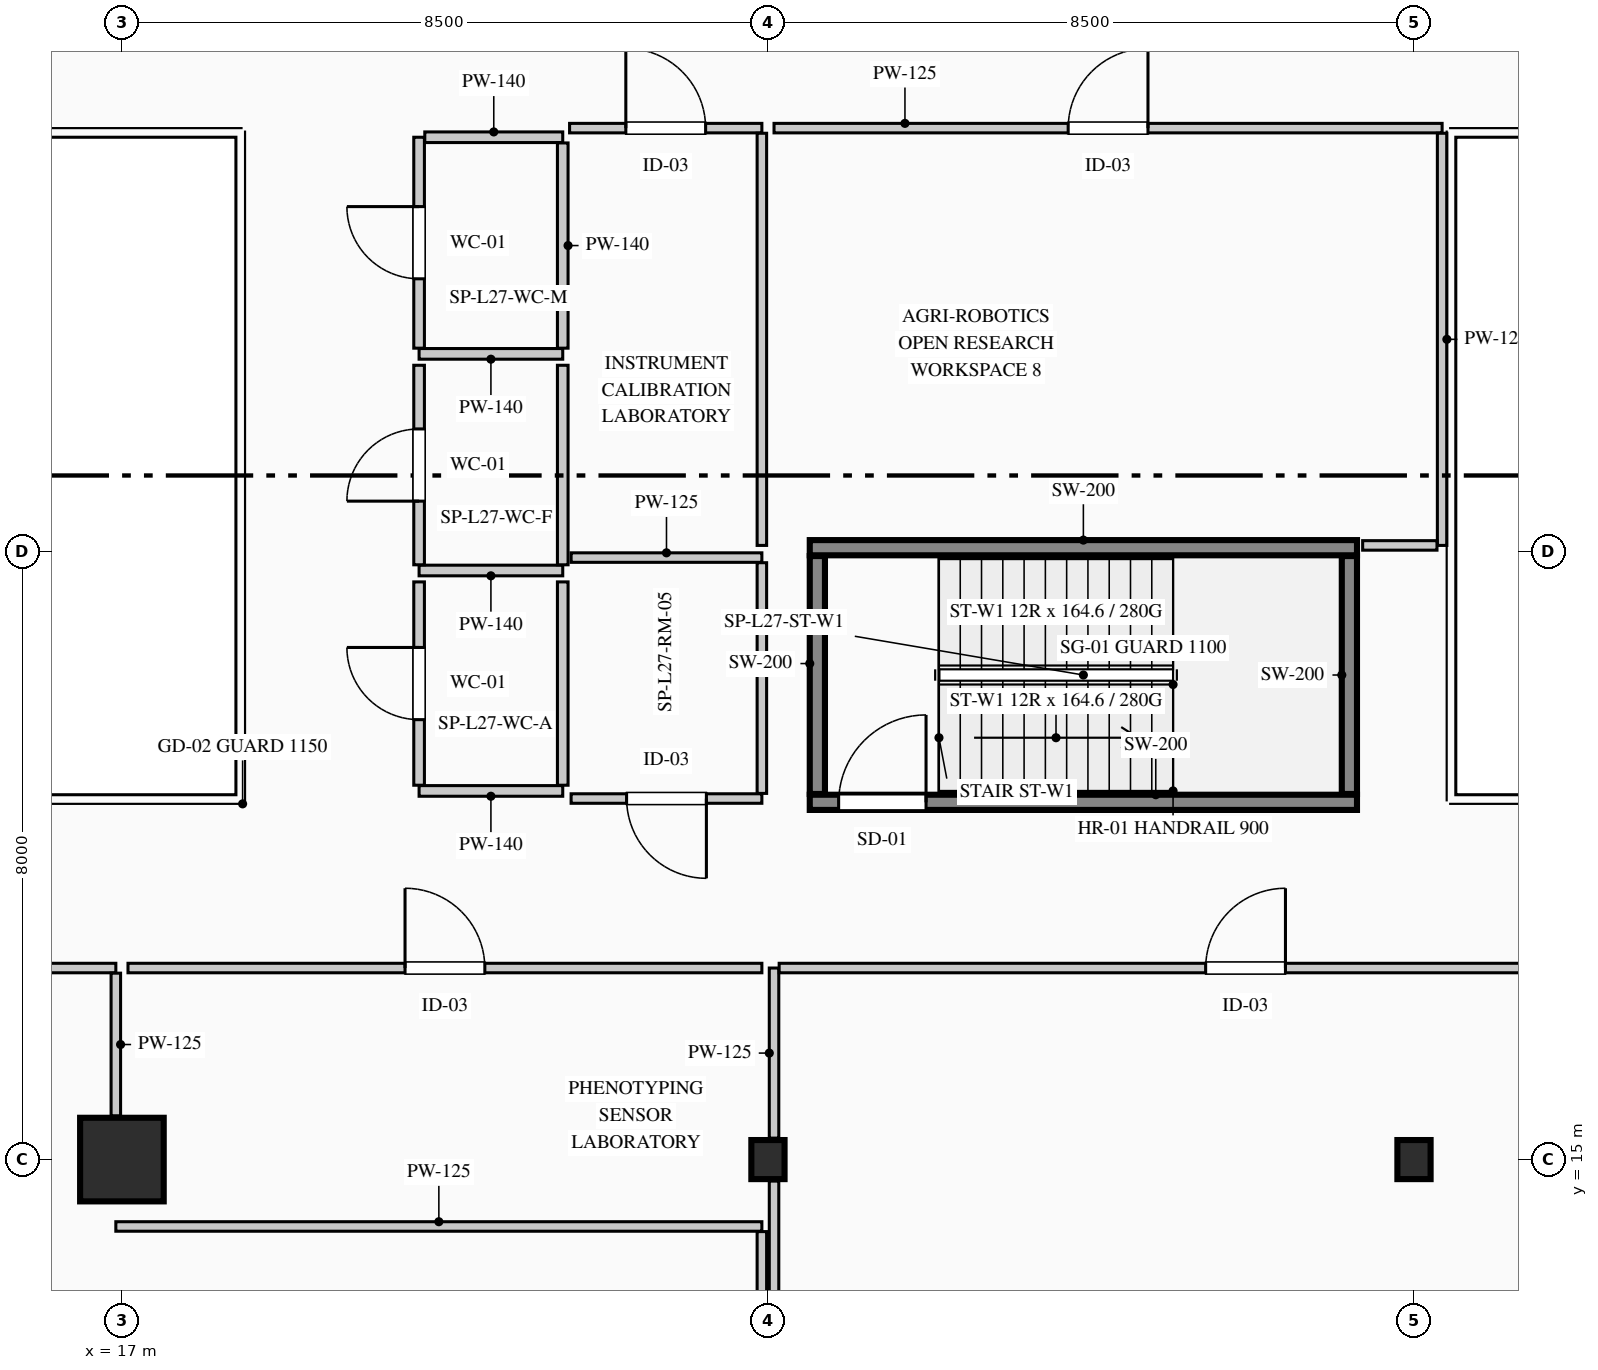
"""IFC4 building model, lengths in metres.
Left out: names, types, materials, properties, quantities, classifications, styles, units other than length and angle.
Written with IfcOpenShell. Run it as: python <this file> out.ifc"""

import sys

from ifc_helpers import new_model, si_unit, direction, frame, frame_2d, origin, origin_2d, place, context, subcontext, project, spatial, rectangle, i_section, extrude, element, fill, save


model = new_model("IFC4")
c1 = context("Model", 3, precision=1e-05, world=origin(), true_north=direction((0.0, 1.0)))
c2 = subcontext(c1, "Body", "Model", "MODEL_VIEW")
j1 = project(units=[si_unit("LENGTHUNIT", "METRE"), si_unit("PLANEANGLEUNIT", "RADIAN")], contexts=[c1])
p1 = place(None, origin())
s1 = spatial("IfcSite", under=j1, at=p1, CompositionType="ELEMENT")
p2 = place(p1, origin())
s2 = spatial("IfcBuilding", under=s1, at=p2, CompositionType="ELEMENT")
p3 = place(p2, frame((0.0, 0.0, 119.3)))
s3 = spatial("IfcBuildingStorey", under=s2, at=p3, CompositionType="ELEMENT", Elevation=119.3)
p4 = place(p3, frame((26.05, 19.7, 0.0), z_axis=(0.0, 0.0, 1.0), x_axis=(1.0, 0.0, 0.0)))
e1 = element("IfcWall", 1, at=p4, inside=s3, PredefinedType="SHEAR", context=c2, shape_type="SweptSolid", body=[
    extrude(rectangle(XDim=7.2, YDim=0.2, at=frame_2d((3.6, 0.0))), origin(), (0.0, 0.0, 1.0), 3.95),
])
p5 = place(p4, frame((0.38, 0.0, 0.0)))
e2 = element("IfcOpeningElement", 2, at=p5, cuts=e1, PredefinedType="OPENING", context=c2, shape_type="SweptSolid", body=[
    extrude(rectangle(XDim=1.15, YDim=2.2, at=frame_2d((0.575, 1.1))), frame((0.0, 0.11, 0.0), z_axis=(0.0, -1.0, 0.0), x_axis=(1.0, 0.0, 0.0)), (0.0, 0.0, 1.0), 0.22),
])
p6 = place(p3, frame((26.05, 23.05, 0.0), z_axis=(0.0, 0.0, 1.0), x_axis=(1.0, 0.0, 0.0)))
e3 = element("IfcWall", 3, at=p6, inside=s3, PredefinedType="SHEAR", context=c2, shape_type="SweptSolid", body=[
    extrude(rectangle(XDim=7.2, YDim=0.2, at=frame_2d((3.6, 0.0))), origin(), (0.0, 0.0, 1.0), 3.95),
])
for number, where, z_axis, x_axis in (
    (4, (26.15, 19.81, 0.0), (0.0, 0.0, 1.0), (0.0, 1.0, 0.0)),
    (5, (33.15, 19.81, 0.0), (0.0, 0.0, 1.0), (0.0, 1.0, 0.0)),
):
    element("IfcWall", number, at=place(p3, frame(where, z_axis=z_axis, x_axis=x_axis)), inside=s3, PredefinedType="SHEAR", context=c2, shape_type="SweptSolid", body=[
        extrude(rectangle(XDim=3.13, YDim=0.2, at=frame_2d((1.565, 0.0))), origin(), (0.0, 0.0, 1.0), 3.95),
    ])
p7 = place(p3, frame((17.0, 15.0, 0.0), z_axis=(0.0, 0.0, 1.0), x_axis=(1.0, 0.0, 0.0)))
e6 = element("IfcColumn", 6, at=p7, inside=s3, PredefinedType="COLUMN", context=c2, shape_type="SweptSolid", body=[
    extrude(rectangle(XDim=1.1, YDim=1.1, at=origin_2d()), origin(), (0.0, 0.0, 1.0), 3.95),
])
for number, where, z_axis, x_axis in (
    (7, (25.5, 15.0, 0.0), (0.0, 0.0, 1.0), (1.0, 0.0, 0.0)),
    (8, (34.0, 15.0, 0.0), (0.0, 0.0, 1.0), (1.0, 0.0, 0.0)),
):
    element("IfcColumn", number, at=place(p3, frame(where, z_axis=z_axis, x_axis=x_axis)), inside=s3, PredefinedType="COLUMN", context=c2, shape_type="SweptSolid", body=[
        extrude(i_section(OverallWidth=0.437, OverallDepth=0.514, WebThickness=0.061, FlangeThickness=0.077, FilletRadius=0.015, at=origin_2d()), origin(), (0.0, 0.0, 1.0), 3.95),
    ])
p8 = place(p3, frame((22.8, 25.6, 0.0), z_axis=(0.0, 0.0, 1.0), x_axis=(-1.0, 0.0, 0.0)))
e9 = element("IfcWall", 9, at=p8, inside=s3, PredefinedType="PARTITIONING", context=c2, shape_type="SweptSolid", body=[
    extrude(rectangle(XDim=1.89, YDim=0.14, at=frame_2d((0.945, 0.0))), origin(), (0.0, 0.0, 1.0), 3.69),
])
p9 = place(p3, frame((20.91, 25.675, 0.0), z_axis=(0.0, 0.0, 1.0), x_axis=(0.0, 1.0, 0.0)))
e10 = element("IfcWall", 10, at=p9, inside=s3, PredefinedType="PARTITIONING", context=c2, shape_type="SweptSolid", body=[
    extrude(rectangle(XDim=2.775, YDim=0.14, at=frame_2d((1.387, 0.0))), origin(), (0.0, 0.0, 1.0), 3.69),
])
p10 = place(p9, frame((0.913, 0.0, 0.0)))
e11 = element("IfcOpeningElement", 11, at=p10, cuts=e10, PredefinedType="OPENING", context=c2, shape_type="SweptSolid", body=[
    extrude(rectangle(XDim=0.95, YDim=2.15, at=frame_2d((0.475, 1.075))), frame((0.0, 0.08, 0.0), z_axis=(0.0, -1.0, 0.0), x_axis=(1.0, 0.0, 0.0)), (0.0, 0.0, 1.0), 0.16),
])
p11 = place(p3, frame((20.985, 28.45, 0.0), z_axis=(0.0, 0.0, 1.0), x_axis=(1.0, 0.0, 0.0)))
e12 = element("IfcWall", 12, at=p11, inside=s3, PredefinedType="PARTITIONING", context=c2, shape_type="SweptSolid", body=[
    extrude(rectangle(XDim=1.815, YDim=0.14, at=frame_2d((0.907, 0.0))), origin(), (0.0, 0.0, 1.0), 3.69),
])
p12 = place(p3, frame((22.8, 28.375, 0.0), z_axis=(0.0, 0.0, 1.0), x_axis=(0.0, -1.0, 0.0)))
e13 = element("IfcWall", 13, at=p12, inside=s3, PredefinedType="PARTITIONING", context=c2, shape_type="SweptSolid", body=[
    extrude(rectangle(XDim=2.7, YDim=0.14, at=frame_2d((1.35, 0.0))), origin(), (0.0, 0.0, 1.0), 3.315),
])
p13 = place(p3, frame((22.8, 22.75, 0.0), z_axis=(0.0, 0.0, 1.0), x_axis=(-1.0, 0.0, 0.0)))
e14 = element("IfcWall", 14, at=p13, inside=s3, PredefinedType="PARTITIONING", context=c2, shape_type="SweptSolid", body=[
    extrude(rectangle(XDim=1.89, YDim=0.14, at=frame_2d((0.945, 0.0))), origin(), (0.0, 0.0, 1.0), 3.69),
])
p14 = place(p3, frame((20.91, 22.825, 0.0), z_axis=(0.0, 0.0, 1.0), x_axis=(0.0, 1.0, 0.0)))
e15 = element("IfcWall", 15, at=p14, inside=s3, PredefinedType="PARTITIONING", context=c2, shape_type="SweptSolid", body=[
    extrude(rectangle(XDim=2.625, YDim=0.14, at=frame_2d((1.312, 0.0))), origin(), (0.0, 0.0, 1.0), 3.69),
])
p15 = place(p14, frame((0.837, 0.0, 0.0)))
e16 = element("IfcOpeningElement", 16, at=p15, cuts=e15, PredefinedType="OPENING", context=c2, shape_type="SweptSolid", body=[
    extrude(rectangle(XDim=0.95, YDim=2.15, at=frame_2d((0.475, 1.075))), frame((0.0, 0.08, 0.0), z_axis=(0.0, -1.0, 0.0), x_axis=(1.0, 0.0, 0.0)), (0.0, 0.0, 1.0), 0.16),
])
p16 = place(p3, frame((22.8, 25.45, 0.0), z_axis=(0.0, 0.0, 1.0), x_axis=(0.0, -1.0, 0.0)))
e17 = element("IfcWall", 17, at=p16, inside=s3, PredefinedType="PARTITIONING", context=c2, shape_type="SweptSolid", body=[
    extrude(rectangle(XDim=2.625, YDim=0.14, at=frame_2d((1.312, 0.0))), origin(), (0.0, 0.0, 1.0), 3.315),
])
p17 = place(p3, frame((22.8, 19.85, 0.0), z_axis=(0.0, 0.0, 1.0), x_axis=(-1.0, 0.0, 0.0)))
e18 = element("IfcWall", 18, at=p17, inside=s3, PredefinedType="PARTITIONING", context=c2, shape_type="SweptSolid", body=[
    extrude(rectangle(XDim=1.89, YDim=0.14, at=frame_2d((0.945, 0.0))), origin(), (0.0, 0.0, 1.0), 3.69),
])
p18 = place(p3, frame((20.91, 19.925, 0.0), z_axis=(0.0, 0.0, 1.0), x_axis=(0.0, 1.0, 0.0)))
e19 = element("IfcWall", 19, at=p18, inside=s3, PredefinedType="PARTITIONING", context=c2, shape_type="SweptSolid", body=[
    extrude(rectangle(XDim=2.675, YDim=0.14, at=frame_2d((1.337, 0.0))), origin(), (0.0, 0.0, 1.0), 3.69),
])
p19 = place(p18, frame((0.863, 0.0, 0.0)))
e20 = element("IfcOpeningElement", 20, at=p19, cuts=e19, PredefinedType="OPENING", context=c2, shape_type="SweptSolid", body=[
    extrude(rectangle(XDim=0.95, YDim=2.15, at=frame_2d((0.475, 1.075))), frame((0.0, 0.08, 0.0), z_axis=(0.0, -1.0, 0.0), x_axis=(1.0, 0.0, 0.0)), (0.0, 0.0, 1.0), 0.16),
])
p20 = place(p3, frame((22.8, 22.6, 0.0), z_axis=(0.0, 0.0, 1.0), x_axis=(0.0, -1.0, 0.0)))
e21 = element("IfcWall", 21, at=p20, inside=s3, PredefinedType="PARTITIONING", context=c2, shape_type="SweptSolid", body=[
    extrude(rectangle(XDim=2.675, YDim=0.14, at=frame_2d((1.337, 0.0))), origin(), (0.0, 0.0, 1.0), 3.315),
])
p21 = place(p3, frame((6.36, 17.52, 0.0), z_axis=(0.0, 0.0, 1.0), x_axis=(1.0, 0.0, 0.0)))
e22 = element("IfcWall", 22, at=p21, inside=s3, PredefinedType="PARTITIONING", context=c2, shape_type="SweptSolid", body=[
    extrude(rectangle(XDim=10.56, YDim=0.125, at=frame_2d((5.28, 0.0))), origin(), (0.0, 0.0, 1.0), 3.69),
])
p22 = place(p21, frame((4.755, 0.0, 0.0)))
e23 = element("IfcOpeningElement", 23, at=p22, cuts=e22, PredefinedType="OPENING", context=c2, shape_type="SweptSolid", body=[
    extrude(rectangle(XDim=1.05, YDim=2.15, at=frame_2d((0.525, 1.075))), frame((0.0, 0.073, 0.0), z_axis=(0.0, -1.0, 0.0), x_axis=(1.0, 0.0, 0.0)), (0.0, 0.0, 1.0), 0.145),
])
p23 = place(p3, frame((16.92, 17.452, 0.0), z_axis=(0.0, 0.0, 1.0), x_axis=(0.0, -1.0, 0.0)))
e24 = element("IfcWall", 24, at=p23, inside=s3, PredefinedType="PARTITIONING", context=c2, shape_type="SweptSolid", body=[
    extrude(rectangle(XDim=1.877, YDim=0.125, at=frame_2d((0.939, 0.0))), origin(), (0.0, 0.0, 1.0), 3.69),
])
p24 = place(p3, frame((16.92, 14.12, 0.0), z_axis=(0.0, 0.0, 1.0), x_axis=(1.0, 0.0, 0.0)))
e25 = element("IfcWall", 25, at=p24, inside=s3, PredefinedType="PARTITIONING", context=c2, shape_type="SweptSolid", body=[
    extrude(rectangle(XDim=8.5, YDim=0.125, at=frame_2d((4.25, 0.0))), origin(), (0.0, 0.0, 1.0), 3.69),
])
p25 = place(p3, frame((25.42, 14.052, 0.0), z_axis=(0.0, 0.0, 1.0), x_axis=(0.0, -1.0, 0.0)))
e26 = element("IfcWall", 26, at=p25, inside=s3, PredefinedType="PARTITIONING", context=c2, shape_type="SweptSolid", body=[
    extrude(rectangle(XDim=1.038, YDim=0.125, at=frame_2d((0.519, 0.0))), origin(), (0.0, 0.0, 1.0), 3.69),
])
p26 = place(p3, frame((25.58, 13.015, 0.0), z_axis=(0.0, 0.0, 1.0), x_axis=(0.0, 1.0, 0.0)))
e27 = element("IfcWall", 27, at=p26, inside=s3, PredefinedType="PARTITIONING", context=c2, shape_type="SweptSolid", body=[
    extrude(rectangle(XDim=1.703, YDim=0.125, at=frame_2d((0.852, 0.0))), origin(), (0.0, 0.0, 1.0), 3.69),
])
p27 = place(p3, frame((25.58, 15.282, 0.0), z_axis=(0.0, 0.0, 1.0), x_axis=(0.0, 1.0, 0.0)))
e28 = element("IfcWall", 28, at=p27, inside=s3, PredefinedType="PARTITIONING", context=c2, shape_type="SweptSolid", body=[
    extrude(rectangle(XDim=2.238, YDim=0.125, at=frame_2d((1.119, 0.0))), origin(), (0.0, 0.0, 1.0), 2.875),
])
p28 = place(p3, frame((25.647, 17.52, 0.0), z_axis=(0.0, 0.0, 1.0), x_axis=(1.0, 0.0, 0.0)))
e29 = element("IfcWall", 29, at=p28, inside=s3, PredefinedType="PARTITIONING", context=c2, shape_type="SweptSolid", body=[
    extrude(rectangle(XDim=12.272, YDim=0.125, at=frame_2d((6.136, 0.0))), origin(), (0.0, 0.0, 1.0), 3.475),
])
p29 = place(p28, frame((5.611, 0.0, 0.0)))
e30 = element("IfcOpeningElement", 30, at=p29, cuts=e29, PredefinedType="OPENING", context=c2, shape_type="SweptSolid", body=[
    extrude(rectangle(XDim=1.05, YDim=2.15, at=frame_2d((0.525, 1.075))), frame((0.0, 0.073, 0.0), z_axis=(0.0, -1.0, 0.0), x_axis=(1.0, 0.0, 0.0)), (0.0, 0.0, 1.0), 0.145),
])
p30 = place(p3, frame((17.08, 17.52, 0.0), z_axis=(0.0, 0.0, 1.0), x_axis=(1.0, 0.0, 0.0)))
e31 = element("IfcWall", 31, at=p30, inside=s3, PredefinedType="PARTITIONING", context=c2, shape_type="SweptSolid", body=[
    extrude(rectangle(XDim=8.34, YDim=0.125, at=frame_2d((4.17, 0.0))), origin(), (0.0, 0.0, 1.0), 3.69),
])
p31 = place(p30, frame((3.645, 0.0, 0.0)))
e32 = element("IfcOpeningElement", 32, at=p31, cuts=e31, PredefinedType="OPENING", context=c2, shape_type="SweptSolid", body=[
    extrude(rectangle(XDim=1.05, YDim=2.15, at=frame_2d((0.525, 1.075))), frame((0.0, 0.073, 0.0), z_axis=(0.0, -1.0, 0.0), x_axis=(1.0, 0.0, 0.0)), (0.0, 0.0, 1.0), 0.145),
])
p32 = place(p3, frame((25.42, 19.75, 0.0), z_axis=(0.0, 0.0, 1.0), x_axis=(-1.0, 0.0, 0.0)))
e33 = element("IfcWall", 33, at=p32, inside=s3, PredefinedType="PARTITIONING", context=c2, shape_type="SweptSolid", body=[
    extrude(rectangle(XDim=2.51, YDim=0.125, at=frame_2d((1.255, 0.0))), origin(), (0.0, 0.0, 1.0), 3.69),
])
p33 = place(p32, frame((0.73, 0.0, 0.0)))
e34 = element("IfcOpeningElement", 34, at=p33, cuts=e33, PredefinedType="OPENING", context=c2, shape_type="SweptSolid", body=[
    extrude(rectangle(XDim=1.05, YDim=2.15, at=frame_2d((0.525, 1.075))), frame((0.0, 0.073, 0.0), z_axis=(0.0, -1.0, 0.0), x_axis=(1.0, 0.0, 0.0)), (0.0, 0.0, 1.0), 0.145),
])
p34 = place(p3, frame((22.91, 22.92, 0.0), z_axis=(0.0, 0.0, 1.0), x_axis=(1.0, 0.0, 0.0)))
e35 = element("IfcWall", 35, at=p34, inside=s3, PredefinedType="PARTITIONING", context=c2, shape_type="SweptSolid", body=[
    extrude(rectangle(XDim=2.51, YDim=0.125, at=frame_2d((1.255, 0.0))), origin(), (0.0, 0.0, 1.0), 3.69),
])
p35 = place(p3, frame((25.42, 22.853, 0.0), z_axis=(0.0, 0.0, 1.0), x_axis=(0.0, -1.0, 0.0)))
e36 = element("IfcWall", 36, at=p35, inside=s3, PredefinedType="PARTITIONING", context=c2, shape_type="SweptSolid", body=[
    extrude(rectangle(XDim=3.035, YDim=0.125, at=frame_2d((1.518, 0.0))), origin(), (0.0, 0.0, 1.0), 2.875),
])
p36 = place(p3, frame((22.89, 28.57, 0.0), z_axis=(0.0, 0.0, 1.0), x_axis=(1.0, 0.0, 0.0)))
e37 = element("IfcWall", 37, at=p36, inside=s3, PredefinedType="PARTITIONING", context=c2, shape_type="SweptSolid", body=[
    extrude(rectangle(XDim=2.53, YDim=0.125, at=frame_2d((1.265, 0.0))), origin(), (0.0, 0.0, 1.0), 3.69),
])
p37 = place(p36, frame((0.74, 0.0, 0.0)))
e38 = element("IfcOpeningElement", 38, at=p37, cuts=e37, PredefinedType="OPENING", context=c2, shape_type="SweptSolid", body=[
    extrude(rectangle(XDim=1.05, YDim=2.15, at=frame_2d((0.525, 1.075))), frame((0.0, 0.073, 0.0), z_axis=(0.0, -1.0, 0.0), x_axis=(1.0, 0.0, 0.0)), (0.0, 0.0, 1.0), 0.145),
])
p38 = place(p3, frame((25.42, 28.502, 0.0), z_axis=(0.0, 0.0, 1.0), x_axis=(0.0, -1.0, 0.0)))
e39 = element("IfcWall", 39, at=p38, inside=s3, PredefinedType="PARTITIONING", context=c2, shape_type="SweptSolid", body=[
    extrude(rectangle(XDim=5.422, YDim=0.125, at=frame_2d((2.711, 0.0))), origin(), (0.0, 0.0, 1.0), 2.875),
])
p39 = place(p3, frame((25.58, 28.57, 0.0), z_axis=(0.0, 0.0, 1.0), x_axis=(1.0, 0.0, 0.0)))
e40 = element("IfcWall", 40, at=p39, inside=s3, PredefinedType="PARTITIONING", context=c2, shape_type="SweptSolid", body=[
    extrude(rectangle(XDim=8.79, YDim=0.125, at=frame_2d((4.395, 0.0))), origin(), (0.0, 0.0, 1.0), 3.475),
])
p40 = place(p39, frame((3.87, 0.0, 0.0)))
e41 = element("IfcOpeningElement", 41, at=p40, cuts=e40, PredefinedType="OPENING", context=c2, shape_type="SweptSolid", body=[
    extrude(rectangle(XDim=1.05, YDim=2.15, at=frame_2d((0.525, 1.075))), frame((0.0, 0.073, 0.0), z_axis=(0.0, -1.0, 0.0), x_axis=(1.0, 0.0, 0.0)), (0.0, 0.0, 1.0), 0.145),
])
p41 = place(p3, frame((34.37, 28.502, 0.0), z_axis=(0.0, 0.0, 1.0), x_axis=(0.0, -1.0, 0.0)))
e42 = element("IfcWall", 42, at=p41, inside=s3, PredefinedType="PARTITIONING", context=c2, shape_type="SweptSolid", body=[
    extrude(rectangle(XDim=5.422, YDim=0.125, at=frame_2d((2.711, 0.0))), origin(), (0.0, 0.0, 1.0), 3.69),
])
p42 = place(p3, frame((34.302, 23.08, 0.0), z_axis=(0.0, 0.0, 1.0), x_axis=(-1.0, 0.0, 0.0)))
e43 = element("IfcWall", 43, at=p42, inside=s3, PredefinedType="PARTITIONING", context=c2, shape_type="SweptSolid", body=[
    extrude(rectangle(XDim=0.978, YDim=0.125, at=frame_2d((0.489, 0.0))), origin(), (0.0, 0.0, 1.0), 3.69),
])
p43 = place(p5, origin())
e44 = element("IfcDoor", 44, at=p43, inside=s3, OperationType="SINGLE_SWING_RIGHT", PredefinedType="DOOR", context=c2, shape_type="SweptSolid", body=[
    extrude(rectangle(XDim=1.15, YDim=2.2, at=frame_2d((0.575, 1.1))), frame((0.0, 0.025, 0.0), z_axis=(0.0, -1.0, 0.0), x_axis=(1.0, 0.0, 0.0)), (0.0, 0.0, 1.0), 0.05),
])
fill(e2, e44)
p44 = place(p10, origin())
e45 = element("IfcDoor", 45, at=p44, inside=s3, OperationType="SINGLE_SWING_RIGHT", PredefinedType="DOOR", context=c2, shape_type="SweptSolid", body=[
    extrude(rectangle(XDim=0.95, YDim=2.15, at=frame_2d((0.475, 1.075))), frame((0.0, 0.025, 0.0), z_axis=(0.0, -1.0, 0.0), x_axis=(1.0, 0.0, 0.0)), (0.0, 0.0, 1.0), 0.05),
])
fill(e11, e45)
p45 = place(p15, origin())
e46 = element("IfcDoor", 46, at=p45, inside=s3, OperationType="SINGLE_SWING_LEFT", PredefinedType="DOOR", context=c2, shape_type="SweptSolid", body=[
    extrude(rectangle(XDim=0.95, YDim=2.15, at=frame_2d((0.475, 1.075))), frame((0.0, 0.025, 0.0), z_axis=(0.0, -1.0, 0.0), x_axis=(1.0, 0.0, 0.0)), (0.0, 0.0, 1.0), 0.05),
])
fill(e16, e46)
p46 = place(p19, origin())
e47 = element("IfcDoor", 47, at=p46, inside=s3, OperationType="SINGLE_SWING_RIGHT", PredefinedType="DOOR", context=c2, shape_type="SweptSolid", body=[
    extrude(rectangle(XDim=0.95, YDim=2.15, at=frame_2d((0.475, 1.075))), frame((0.0, 0.025, 0.0), z_axis=(0.0, -1.0, 0.0), x_axis=(1.0, 0.0, 0.0)), (0.0, 0.0, 1.0), 0.05),
])
fill(e20, e47)
p47 = place(p29, origin())
e48 = element("IfcDoor", 48, at=p47, inside=s3, OperationType="SINGLE_SWING_RIGHT", PredefinedType="DOOR", context=c2, shape_type="SweptSolid", body=[
    extrude(rectangle(XDim=1.05, YDim=2.15, at=frame_2d((0.525, 1.075))), frame((0.0, 0.025, 0.0), z_axis=(0.0, -1.0, 0.0), x_axis=(1.0, 0.0, 0.0)), (0.0, 0.0, 1.0), 0.05),
])
fill(e30, e48)
p48 = place(p31, origin())
e49 = element("IfcDoor", 49, at=p48, inside=s3, OperationType="SINGLE_SWING_LEFT", PredefinedType="DOOR", context=c2, shape_type="SweptSolid", body=[
    extrude(rectangle(XDim=1.05, YDim=2.15, at=frame_2d((0.525, 1.075))), frame((0.0, 0.025, 0.0), z_axis=(0.0, -1.0, 0.0), x_axis=(1.0, 0.0, 0.0)), (0.0, 0.0, 1.0), 0.05),
])
fill(e32, e49)
p49 = place(p33, origin())
e50 = element("IfcDoor", 50, at=p49, inside=s3, OperationType="SINGLE_SWING_LEFT", PredefinedType="DOOR", context=c2, shape_type="SweptSolid", body=[
    extrude(rectangle(XDim=1.05, YDim=2.15, at=frame_2d((0.525, 1.075))), frame((0.0, 0.025, 0.0), z_axis=(0.0, -1.0, 0.0), x_axis=(1.0, 0.0, 0.0)), (0.0, 0.0, 1.0), 0.05),
])
fill(e34, e50)
p50 = place(p37, origin())
e51 = element("IfcDoor", 51, at=p50, inside=s3, OperationType="SINGLE_SWING_LEFT", PredefinedType="DOOR", context=c2, shape_type="SweptSolid", body=[
    extrude(rectangle(XDim=1.05, YDim=2.15, at=frame_2d((0.525, 1.075))), frame((0.0, 0.025, 0.0), z_axis=(0.0, -1.0, 0.0), x_axis=(1.0, 0.0, 0.0)), (0.0, 0.0, 1.0), 0.05),
])
fill(e38, e51)
p51 = place(p40, origin())
e52 = element("IfcDoor", 52, at=p51, inside=s3, OperationType="SINGLE_SWING_RIGHT", PredefinedType="DOOR", context=c2, shape_type="SweptSolid", body=[
    extrude(rectangle(XDim=1.05, YDim=2.15, at=frame_2d((0.525, 1.075))), frame((0.0, 0.025, 0.0), z_axis=(0.0, -1.0, 0.0), x_axis=(1.0, 0.0, 0.0)), (0.0, 0.0, 1.0), 0.05),
])
fill(e41, e52)
save(model, sys.argv[1])
